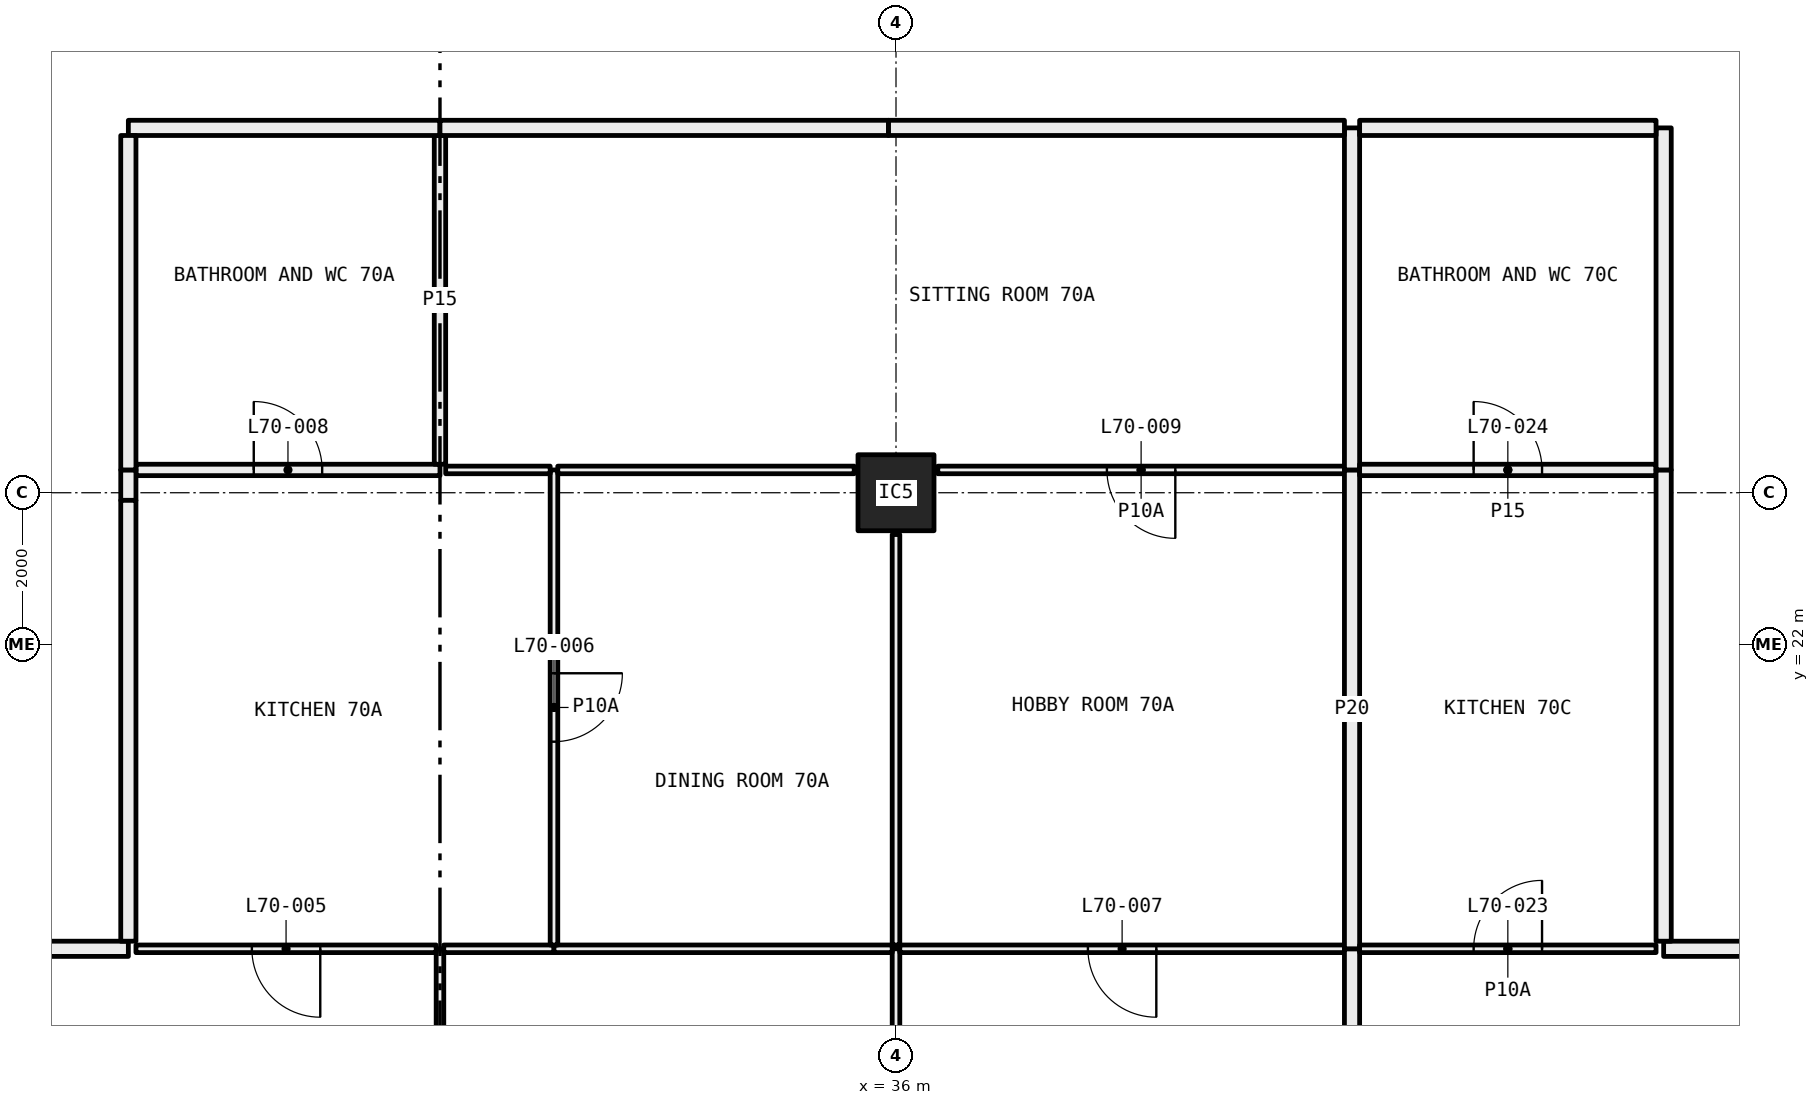
"""IFC4 building model, lengths in metres.
Left out: names, types, materials, properties, quantities, classifications, styles, units other than length and angle.
Written with IfcOpenShell. Run it as: python <this file> out.ifc"""

import sys

from ifc_helpers import new_model, si_unit, direction, frame, frame_2d, origin, origin_2d, place, context, subcontext, project, spatial, rectangle, hollow_rectangle, extrude, element, fill, save


model = new_model("IFC4")
c1 = context("Model", 3, precision=1e-05, world=origin(), true_north=direction((0.0, 1.0)))
c2 = subcontext(c1, "Body", "Model", "MODEL_VIEW")
j1 = project(units=[si_unit("LENGTHUNIT", "METRE"), si_unit("PLANEANGLEUNIT", "RADIAN")], contexts=[c1])
p1 = place(None, origin())
s1 = spatial("IfcSite", under=j1, at=p1, CompositionType="ELEMENT")
p2 = place(p1, origin())
s2 = spatial("IfcBuilding", under=s1, at=p2, CompositionType="ELEMENT")
p3 = place(p2, frame((0.0, 0.0, 259.35)))
s3 = spatial("IfcBuildingStorey", under=s2, at=p3, CompositionType="ELEMENT", Elevation=259.35)
p4 = place(p3, frame((36.0, 24.0, 0.0), z_axis=(0.0, 0.0, 1.0), x_axis=(1.0, 0.0, 0.0)))
e1 = element("IfcColumn", 1, at=p4, inside=s3, PredefinedType="COLUMN", context=c2, shape_type="SweptSolid", body=[
    extrude(hollow_rectangle(XDim=1.0, YDim=1.0, WallThickness=0.04, at=origin_2d()), origin(), (0.0, 0.0, 1.0), 3.05),
])
p5 = place(p3, frame((30.0, 12.72, 0.0), z_axis=(0.0, 0.0, 1.0), x_axis=(0.0, 1.0, 0.0)))
e2 = element("IfcWall", 2, at=p5, inside=s3, PredefinedType="PARTITIONING", context=c2, shape_type="SweptSolid", body=[
    extrude(rectangle(XDim=5.28, YDim=0.1, at=frame_2d((2.64, 0.0))), origin(), (0.0, 0.0, 1.0), 3.05),
])
p6 = place(p5, frame((2.19, 0.0, 0.0)))
e3 = element("IfcOpeningElement", 3, at=p6, cuts=e2, PredefinedType="OPENING", context=c2, shape_type="SweptSolid", body=[
    extrude(rectangle(XDim=0.9, YDim=2.1, at=frame_2d((0.45, 1.05))), frame((0.0, 0.06, 0.0), z_axis=(0.0, -1.0, 0.0), x_axis=(1.0, 0.0, 0.0)), (0.0, 0.0, 1.0), 0.12),
])
p7 = place(p3, frame((29.95, 18.0, 0.0), z_axis=(0.0, 0.0, 1.0), x_axis=(-1.0, 0.0, 0.0)))
e4 = element("IfcWall", 4, at=p7, inside=s3, PredefinedType="PARTITIONING", context=c2, shape_type="SweptSolid", body=[
    extrude(rectangle(XDim=3.95, YDim=0.1, at=frame_2d((1.975, 0.0))), origin(), (0.0, 0.0, 1.0), 3.05),
])
p8 = place(p7, frame((1.525, 0.0, 0.0)))
e5 = element("IfcOpeningElement", 5, at=p8, cuts=e4, PredefinedType="OPENING", context=c2, shape_type="SweptSolid", body=[
    extrude(rectangle(XDim=0.9, YDim=2.1, at=frame_2d((0.45, 1.05))), frame((0.0, 0.06, 0.0), z_axis=(0.0, -1.0, 0.0), x_axis=(1.0, 0.0, 0.0)), (0.0, 0.0, 1.0), 0.12),
])
p9 = place(p3, frame((25.9, 18.0, 0.0), z_axis=(0.0, 0.0, 1.0), x_axis=(-1.0, 0.0, 0.0)))
e6 = element("IfcWall", 6, at=p9, inside=s3, PredefinedType="PARTITIONING", context=c2, shape_type="SweptSolid", body=[
    extrude(rectangle(XDim=1.9, YDim=0.2, at=frame_2d((0.95, 0.0))), origin(), (0.0, 0.0, 1.0), 3.05),
])
p10 = place(p3, frame((36.0, 12.72, 0.0), z_axis=(0.0, 0.0, 1.0), x_axis=(0.0, 1.0, 0.0)))
e7 = element("IfcWall", 7, at=p10, inside=s3, PredefinedType="PARTITIONING", context=c2, shape_type="SweptSolid", body=[
    extrude(rectangle(XDim=5.28, YDim=0.1, at=frame_2d((2.64, 0.0))), origin(), (0.0, 0.0, 1.0), 2.45),
])
p11 = place(p10, frame((2.19, 0.0, 0.0)))
e8 = element("IfcOpeningElement", 8, at=p11, cuts=e7, PredefinedType="OPENING", context=c2, shape_type="SweptSolid", body=[
    extrude(rectangle(XDim=0.9, YDim=2.1, at=frame_2d((0.45, 1.05))), frame((0.0, 0.06, 0.0), z_axis=(0.0, -1.0, 0.0), x_axis=(1.0, 0.0, 0.0)), (0.0, 0.0, 1.0), 0.12),
])
p12 = place(p3, frame((31.5, 18.0, 0.0), z_axis=(0.0, 0.0, 1.0), x_axis=(-1.0, 0.0, 0.0)))
e9 = element("IfcWall", 9, at=p12, inside=s3, PredefinedType="PARTITIONING", context=c2, shape_type="SweptSolid", body=[
    extrude(rectangle(XDim=1.45, YDim=0.1, at=frame_2d((0.725, 0.0))), origin(), (0.0, 0.0, 1.0), 3.05),
])
p13 = place(p3, frame((35.95, 18.0, 0.0), z_axis=(0.0, 0.0, 1.0), x_axis=(-1.0, 0.0, 0.0)))
e10 = element("IfcWall", 10, at=p13, inside=s3, PredefinedType="PARTITIONING", context=c2, shape_type="SweptSolid", body=[
    extrude(rectangle(XDim=4.45, YDim=0.1, at=frame_2d((2.225, 0.0))), origin(), (0.0, 0.0, 1.0), 2.45),
])
p14 = place(p3, frame((41.9, 18.0, 0.0), z_axis=(0.0, 0.0, 1.0), x_axis=(-1.0, 0.0, 0.0)))
e11 = element("IfcWall", 11, at=p14, inside=s3, PredefinedType="PARTITIONING", context=c2, shape_type="SweptSolid", body=[
    extrude(rectangle(XDim=5.85, YDim=0.1, at=frame_2d((2.925, 0.0))), origin(), (0.0, 0.0, 1.0), 2.45),
])
p15 = place(p14, frame((2.475, 0.0, 0.0)))
e12 = element("IfcOpeningElement", 12, at=p15, cuts=e11, PredefinedType="OPENING", context=c2, shape_type="SweptSolid", body=[
    extrude(rectangle(XDim=0.9, YDim=2.1, at=frame_2d((0.45, 1.05))), frame((0.0, 0.06, 0.0), z_axis=(0.0, -1.0, 0.0), x_axis=(1.0, 0.0, 0.0)), (0.0, 0.0, 1.0), 0.12),
])
p16 = place(p3, frame((42.0, 12.72, 0.0), z_axis=(0.0, 0.0, 1.0), x_axis=(0.0, 1.0, 0.0)))
e13 = element("IfcWall", 13, at=p16, inside=s3, PredefinedType="PARTITIONING", context=c2, shape_type="SweptSolid", body=[
    extrude(rectangle(XDim=5.28, YDim=0.2, at=frame_2d((2.64, 0.0))), origin(), (0.0, 0.0, 1.0), 3.05),
])
p17 = place(p3, frame((31.5, 18.05, 0.0), z_axis=(0.0, 0.0, 1.0), x_axis=(0.0, 1.0, 0.0)))
e14 = element("IfcWall", 14, at=p17, inside=s3, PredefinedType="PARTITIONING", context=c2, shape_type="SweptSolid", body=[
    extrude(rectangle(XDim=6.25, YDim=0.1, at=frame_2d((3.125, 0.0))), origin(), (0.0, 0.0, 1.0), 2.45),
])
p18 = place(p17, frame((2.675, 0.0, 0.0)))
e15 = element("IfcOpeningElement", 15, at=p18, cuts=e14, PredefinedType="OPENING", context=c2, shape_type="SweptSolid", body=[
    extrude(rectangle(XDim=0.9, YDim=2.1, at=frame_2d((0.45, 1.05))), frame((0.0, 0.06, 0.0), z_axis=(0.0, -1.0, 0.0), x_axis=(1.0, 0.0, 0.0)), (0.0, 0.0, 1.0), 0.12),
])
p19 = place(p3, frame((30.0, 24.3, 0.0), z_axis=(0.0, 0.0, 1.0), x_axis=(-1.0, 0.0, 0.0)))
e16 = element("IfcWall", 16, at=p19, inside=s3, PredefinedType="PARTITIONING", context=c2, shape_type="SweptSolid", body=[
    extrude(rectangle(XDim=4.0, YDim=0.15, at=frame_2d((2.0, 0.0))), origin(), (0.0, 0.0, 1.0), 3.05),
])
p20 = place(p19, frame((1.55, 0.0, 0.0)))
e17 = element("IfcOpeningElement", 17, at=p20, cuts=e16, PredefinedType="OPENING", context=c2, shape_type="SweptSolid", body=[
    extrude(rectangle(XDim=0.9, YDim=2.1, at=frame_2d((0.45, 1.05))), frame((0.0, 0.085, 0.0), z_axis=(0.0, -1.0, 0.0), x_axis=(1.0, 0.0, 0.0)), (0.0, 0.0, 1.0), 0.17),
])
p21 = place(p3, frame((31.45, 24.3, 0.0), z_axis=(0.0, 0.0, 1.0), x_axis=(-1.0, 0.0, 0.0)))
e18 = element("IfcWall", 18, at=p21, inside=s3, PredefinedType="PARTITIONING", context=c2, shape_type="SweptSolid", body=[
    extrude(rectangle(XDim=1.375, YDim=0.1, at=frame_2d((0.688, 0.0))), origin(), (0.0, 0.0, 1.0), 3.05),
])
p22 = place(p3, frame((25.9, 24.3, 0.0), z_axis=(0.0, 0.0, 1.0), x_axis=(0.0, -1.0, 0.0)))
e19 = element("IfcWall", 19, at=p22, inside=s3, PredefinedType="PARTITIONING", context=c2, shape_type="SweptSolid", body=[
    extrude(rectangle(XDim=0.4, YDim=0.2, at=frame_2d((0.2, 0.0))), origin(), (0.0, 0.0, 1.0), 2.45),
])
p23 = place(p3, frame((25.9, 23.9, 0.0), z_axis=(0.0, 0.0, 1.0), x_axis=(0.0, -1.0, 0.0)))
e20 = element("IfcWall", 20, at=p23, inside=s3, PredefinedType="PARTITIONING", context=c2, shape_type="SweptSolid", body=[
    extrude(rectangle(XDim=5.8, YDim=0.2, at=frame_2d((2.9, 0.0))), origin(), (0.0, 0.0, 1.0), 3.05),
])
p24 = place(p3, frame((36.0, 18.05, 0.0), z_axis=(0.0, 0.0, 1.0), x_axis=(0.0, 1.0, 0.0)))
e21 = element("IfcWall", 21, at=p24, inside=s3, PredefinedType="PARTITIONING", context=c2, shape_type="SweptSolid", body=[
    extrude(rectangle(XDim=5.4, YDim=0.1, at=frame_2d((2.7, 0.0))), origin(), (0.0, 0.0, 1.0), 2.45),
])
p25 = place(p3, frame((35.45, 24.3, 0.0), z_axis=(0.0, 0.0, 1.0), x_axis=(-1.0, 0.0, 0.0)))
e22 = element("IfcWall", 22, at=p25, inside=s3, PredefinedType="PARTITIONING", context=c2, shape_type="SweptSolid", body=[
    extrude(rectangle(XDim=3.9, YDim=0.1, at=frame_2d((1.95, 0.0))), origin(), (0.0, 0.0, 1.0), 3.05),
])
p26 = place(p3, frame((41.9, 24.3, 0.0), z_axis=(0.0, 0.0, 1.0), x_axis=(-1.0, 0.0, 0.0)))
e23 = element("IfcWall", 23, at=p26, inside=s3, PredefinedType="PARTITIONING", context=c2, shape_type="SweptSolid", body=[
    extrude(rectangle(XDim=5.35, YDim=0.1, at=frame_2d((2.675, 0.0))), origin(), (0.0, 0.0, 1.0), 3.05),
])
p27 = place(p26, frame((2.225, 0.0, 0.0)))
e24 = element("IfcOpeningElement", 24, at=p27, cuts=e23, PredefinedType="OPENING", context=c2, shape_type="SweptSolid", body=[
    extrude(rectangle(XDim=0.9, YDim=2.1, at=frame_2d((0.45, 1.05))), frame((0.0, 0.06, 0.0), z_axis=(0.0, -1.0, 0.0), x_axis=(1.0, 0.0, 0.0)), (0.0, 0.0, 1.0), 0.12),
])
p28 = place(p3, frame((42.0, 18.0, 0.0), z_axis=(0.0, 0.0, 1.0), x_axis=(0.0, 1.0, 0.0)))
e25 = element("IfcWall", 25, at=p28, inside=s3, PredefinedType="PARTITIONING", context=c2, shape_type="SweptSolid", body=[
    extrude(rectangle(XDim=6.3, YDim=0.2, at=frame_2d((3.15, 0.0))), origin(), (0.0, 0.0, 1.0), 2.45),
])
p29 = place(p3, frame((30.0, 24.375, 0.0), z_axis=(0.0, 0.0, 1.0), x_axis=(0.0, 1.0, 0.0)))
e26 = element("IfcWall", 26, at=p29, inside=s3, PredefinedType="PARTITIONING", context=c2, shape_type="SweptSolid", body=[
    extrude(rectangle(XDim=4.325, YDim=0.15, at=frame_2d((2.163, 0.0))), origin(), (0.0, 0.0, 1.0), 3.05),
])
p30 = place(p3, frame((30.0, 28.8, 0.0), z_axis=(0.0, 0.0, 1.0), x_axis=(-1.0, 0.0, 0.0)))
e27 = element("IfcWall", 27, at=p30, inside=s3, PredefinedType="PARTITIONING", context=c2, shape_type="SweptSolid", body=[
    extrude(rectangle(XDim=4.1, YDim=0.2, at=frame_2d((2.05, 0.0))), origin(), (0.0, 0.0, 1.0), 3.05),
])
p31 = place(p3, frame((25.9, 28.7, 0.0), z_axis=(0.0, 0.0, 1.0), x_axis=(0.0, -1.0, 0.0)))
e28 = element("IfcWall", 28, at=p31, inside=s3, PredefinedType="PARTITIONING", context=c2, shape_type="SweptSolid", body=[
    extrude(rectangle(XDim=4.4, YDim=0.2, at=frame_2d((2.2, 0.0))), origin(), (0.0, 0.0, 1.0), 3.05),
])
p32 = place(p3, frame((42.0, 24.3, 0.0), z_axis=(0.0, 0.0, 1.0), x_axis=(0.0, 1.0, 0.0)))
e29 = element("IfcWall", 29, at=p32, inside=s3, PredefinedType="PARTITIONING", context=c2, shape_type="SweptSolid", body=[
    extrude(rectangle(XDim=4.5, YDim=0.2, at=frame_2d((2.25, 0.0))), origin(), (0.0, 0.0, 1.0), 3.05),
])
p33 = place(p3, frame((41.9, 28.8, 0.0), z_axis=(0.0, 0.0, 1.0), x_axis=(-1.0, 0.0, 0.0)))
e30 = element("IfcWall", 30, at=p33, inside=s3, PredefinedType="PARTITIONING", context=c2, shape_type="SweptSolid", body=[
    extrude(rectangle(XDim=6.0, YDim=0.2, at=frame_2d((3.0, 0.0))), origin(), (0.0, 0.0, 1.0), 2.45),
])
p34 = place(p3, frame((35.9, 28.8, 0.0), z_axis=(0.0, 0.0, 1.0), x_axis=(-1.0, 0.0, 0.0)))
e31 = element("IfcWall", 31, at=p34, inside=s3, PredefinedType="PARTITIONING", context=c2, shape_type="SweptSolid", body=[
    extrude(rectangle(XDim=5.9, YDim=0.2, at=frame_2d((2.95, 0.0))), origin(), (0.0, 0.0, 1.0), 3.05),
])
p35 = place(p3, frame((46.0, 18.0, 0.0), z_axis=(0.0, 0.0, 1.0), x_axis=(-1.0, 0.0, 0.0)))
e32 = element("IfcWall", 32, at=p35, inside=s3, PredefinedType="PARTITIONING", context=c2, shape_type="SweptSolid", body=[
    extrude(rectangle(XDim=3.9, YDim=0.1, at=frame_2d((1.95, 0.0))), origin(), (0.0, 0.0, 1.0), 3.05),
])
p36 = place(p35, frame((1.5, 0.0, 0.0)))
e33 = element("IfcOpeningElement", 33, at=p36, cuts=e32, PredefinedType="OPENING", context=c2, shape_type="SweptSolid", body=[
    extrude(rectangle(XDim=0.9, YDim=2.1, at=frame_2d((0.45, 1.05))), frame((0.0, 0.06, 0.0), z_axis=(0.0, -1.0, 0.0), x_axis=(1.0, 0.0, 0.0)), (0.0, 0.0, 1.0), 0.12),
])
p37 = place(p3, frame((48.0, 18.0, 0.0), z_axis=(0.0, 0.0, 1.0), x_axis=(-1.0, 0.0, 0.0)))
e34 = element("IfcWall", 34, at=p37, inside=s3, PredefinedType="PARTITIONING", context=c2, shape_type="SweptSolid", body=[
    extrude(rectangle(XDim=1.9, YDim=0.2, at=frame_2d((0.95, 0.0))), origin(), (0.0, 0.0, 1.0), 3.05),
])
p38 = place(p3, frame((46.0, 24.3, 0.0), z_axis=(0.0, 0.0, 1.0), x_axis=(-1.0, 0.0, 0.0)))
e35 = element("IfcWall", 35, at=p38, inside=s3, PredefinedType="PARTITIONING", context=c2, shape_type="SweptSolid", body=[
    extrude(rectangle(XDim=3.9, YDim=0.15, at=frame_2d((1.95, 0.0))), origin(), (0.0, 0.0, 1.0), 3.05),
])
p39 = place(p38, frame((1.5, 0.0, 0.0)))
e36 = element("IfcOpeningElement", 36, at=p39, cuts=e35, PredefinedType="OPENING", context=c2, shape_type="SweptSolid", body=[
    extrude(rectangle(XDim=0.9, YDim=2.1, at=frame_2d((0.45, 1.05))), frame((0.0, 0.085, 0.0), z_axis=(0.0, -1.0, 0.0), x_axis=(1.0, 0.0, 0.0)), (0.0, 0.0, 1.0), 0.17),
])
p40 = place(p3, frame((46.1, 18.1, 0.0), z_axis=(0.0, 0.0, 1.0), x_axis=(0.0, 1.0, 0.0)))
e37 = element("IfcWall", 37, at=p40, inside=s3, PredefinedType="PARTITIONING", context=c2, shape_type="SweptSolid", body=[
    extrude(rectangle(XDim=6.2, YDim=0.2, at=frame_2d((3.1, 0.0))), origin(), (0.0, 0.0, 1.0), 2.45),
])
p41 = place(p3, frame((46.1, 24.3, 0.0), z_axis=(0.0, 0.0, 1.0), x_axis=(0.0, 1.0, 0.0)))
e38 = element("IfcWall", 38, at=p41, inside=s3, PredefinedType="PARTITIONING", context=c2, shape_type="SweptSolid", body=[
    extrude(rectangle(XDim=4.5, YDim=0.2, at=frame_2d((2.25, 0.0))), origin(), (0.0, 0.0, 1.0), 3.05),
])
p42 = place(p3, frame((46.0, 28.8, 0.0), z_axis=(0.0, 0.0, 1.0), x_axis=(-1.0, 0.0, 0.0)))
e39 = element("IfcWall", 39, at=p42, inside=s3, PredefinedType="PARTITIONING", context=c2, shape_type="SweptSolid", body=[
    extrude(rectangle(XDim=3.9, YDim=0.2, at=frame_2d((1.95, 0.0))), origin(), (0.0, 0.0, 1.0), 3.05),
])
p43 = place(p8, origin())
e40 = element("IfcDoor", 40, at=p43, inside=s3, OperationType="SINGLE_SWING_RIGHT", PredefinedType="DOOR", context=c2, shape_type="SweptSolid", body=[
    extrude(rectangle(XDim=0.9, YDim=2.1, at=frame_2d((0.45, 1.05))), frame((0.0, 0.025, 0.0), z_axis=(0.0, -1.0, 0.0), x_axis=(1.0, 0.0, 0.0)), (0.0, 0.0, 1.0), 0.05),
])
fill(e5, e40)
p44 = place(p18, frame((0.9, 0.0, 0.0), x_axis=(-1.0, 0.0, 0.0)))
e41 = element("IfcDoor", 41, at=p44, inside=s3, OperationType="SINGLE_SWING_RIGHT", PredefinedType="DOOR", context=c2, shape_type="SweptSolid", body=[
    extrude(rectangle(XDim=0.9, YDim=2.1, at=frame_2d((0.45, 1.05))), frame((0.0, 0.025, 0.0), z_axis=(0.0, -1.0, 0.0), x_axis=(1.0, 0.0, 0.0)), (0.0, 0.0, 1.0), 0.05),
])
fill(e15, e41)
p45 = place(p15, origin())
e42 = element("IfcDoor", 42, at=p45, inside=s3, OperationType="SINGLE_SWING_RIGHT", PredefinedType="DOOR", context=c2, shape_type="SweptSolid", body=[
    extrude(rectangle(XDim=0.9, YDim=2.1, at=frame_2d((0.45, 1.05))), frame((0.0, 0.025, 0.0), z_axis=(0.0, -1.0, 0.0), x_axis=(1.0, 0.0, 0.0)), (0.0, 0.0, 1.0), 0.05),
])
fill(e12, e42)
p46 = place(p20, frame((0.9, 0.0, 0.0), x_axis=(-1.0, 0.0, 0.0)))
e43 = element("IfcDoor", 43, at=p46, inside=s3, OperationType="SINGLE_SWING_RIGHT", PredefinedType="DOOR", context=c2, shape_type="SweptSolid", body=[
    extrude(rectangle(XDim=0.9, YDim=2.1, at=frame_2d((0.45, 1.05))), frame((0.0, 0.025, 0.0), z_axis=(0.0, -1.0, 0.0), x_axis=(1.0, 0.0, 0.0)), (0.0, 0.0, 1.0), 0.05),
])
fill(e17, e43)
p47 = place(p27, origin())
e44 = element("IfcDoor", 44, at=p47, inside=s3, OperationType="SINGLE_SWING_RIGHT", PredefinedType="DOOR", context=c2, shape_type="SweptSolid", body=[
    extrude(rectangle(XDim=0.9, YDim=2.1, at=frame_2d((0.45, 1.05))), frame((0.0, 0.025, 0.0), z_axis=(0.0, -1.0, 0.0), x_axis=(1.0, 0.0, 0.0)), (0.0, 0.0, 1.0), 0.05),
])
fill(e24, e44)
p48 = place(p36, frame((0.9, 0.0, 0.0), x_axis=(-1.0, 0.0, 0.0)))
e45 = element("IfcDoor", 45, at=p48, inside=s3, OperationType="SINGLE_SWING_LEFT", PredefinedType="DOOR", context=c2, shape_type="SweptSolid", body=[
    extrude(rectangle(XDim=0.9, YDim=2.1, at=frame_2d((0.45, 1.05))), frame((0.0, 0.025, 0.0), z_axis=(0.0, -1.0, 0.0), x_axis=(1.0, 0.0, 0.0)), (0.0, 0.0, 1.0), 0.05),
])
fill(e33, e45)
p49 = place(p39, frame((0.9, 0.0, 0.0), x_axis=(-1.0, 0.0, 0.0)))
e46 = element("IfcDoor", 46, at=p49, inside=s3, OperationType="SINGLE_SWING_RIGHT", PredefinedType="DOOR", context=c2, shape_type="SweptSolid", body=[
    extrude(rectangle(XDim=0.9, YDim=2.1, at=frame_2d((0.45, 1.05))), frame((0.0, 0.025, 0.0), z_axis=(0.0, -1.0, 0.0), x_axis=(1.0, 0.0, 0.0)), (0.0, 0.0, 1.0), 0.05),
])
fill(e36, e46)
save(model, sys.argv[1])
